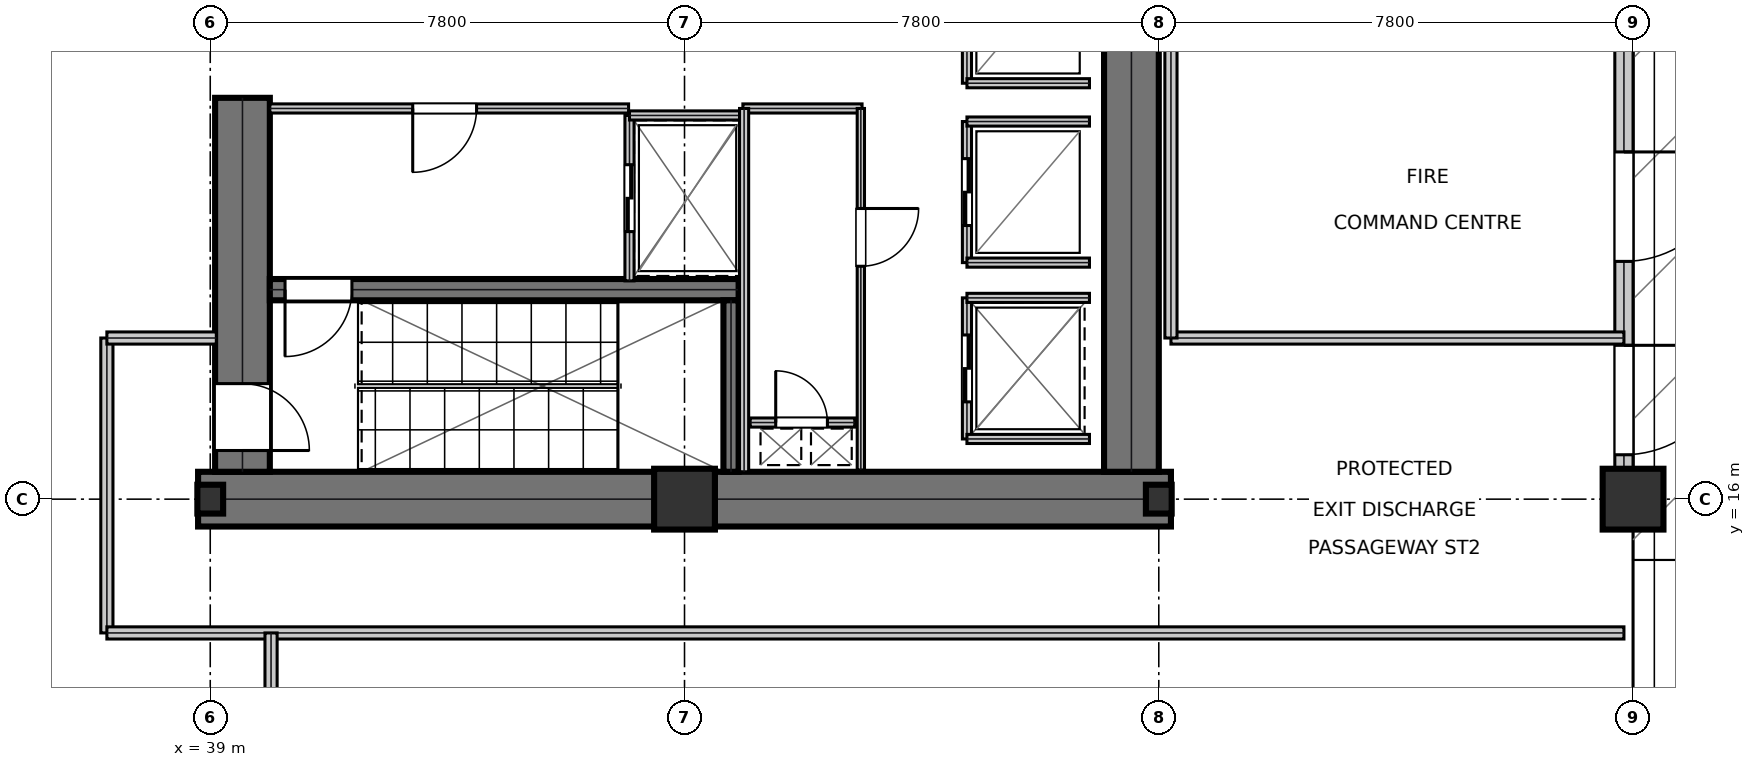
"""IFC4 building model, lengths in metres.
Left out: names, types, materials, properties, quantities, classifications, styles, units other than length and angle.
Written with IfcOpenShell. Run it as: python <this file> out.ifc"""

import sys

from ifc_helpers import new_model, si_unit, direction, frame, frame_2d, origin, origin_2d, place, context, subcontext, project, spatial, rectangle, i_section, extrude, element, fill, save


model = new_model("IFC4")
c1 = context("Model", 3, precision=1e-05, world=origin(), true_north=direction((0.0, 1.0)))
c2 = subcontext(c1, "Body", "Model", "MODEL_VIEW")
j1 = project(units=[si_unit("LENGTHUNIT", "METRE"), si_unit("PLANEANGLEUNIT", "RADIAN")], contexts=[c1])
p1 = place(None, origin())
s1 = spatial("IfcSite", under=j1, at=p1, CompositionType="ELEMENT")
p2 = place(p1, origin())
s2 = spatial("IfcBuilding", under=s1, at=p2, CompositionType="ELEMENT")
p3 = place(p2, origin())
s3 = spatial("IfcBuildingStorey", under=s2, at=p3, CompositionType="ELEMENT", Elevation=0.0)
p4 = place(p3, frame((38.8, 16.0, 0.0), z_axis=(0.0, 0.0, 1.0), x_axis=(1.0, 0.0, 0.0)))
e1 = element("IfcWall", 1, at=p4, inside=s3, PredefinedType="SHEAR", context=c2, shape_type="SweptSolid", body=[
    extrude(rectangle(XDim=16.0, YDim=0.9, at=frame_2d((8.0, 0.0))), origin(), (0.0, 0.0, 1.0), 5.12),
])
p5 = place(p3, frame((39.53, 16.45, 0.0), z_axis=(0.0, 0.0, 1.0), x_axis=(0.0, 1.0, 0.0)))
e2 = element("IfcWall", 2, at=p5, inside=s3, PredefinedType="SHEAR", context=c2, shape_type="SweptSolid", body=[
    extrude(rectangle(XDim=6.15, YDim=0.9, at=frame_2d((3.075, 0.0))), origin(), (0.0, 0.0, 1.0), 5.12),
])
p6 = place(p5, frame((0.35, 0.0, 0.0)))
e3 = element("IfcOpeningElement", 3, at=p6, cuts=e2, PredefinedType="OPENING", context=c2, shape_type="SweptSolid", body=[
    extrude(rectangle(XDim=1.1, YDim=2.15, at=frame_2d((0.55, 1.075))), frame((0.0, 0.46, 0.0), z_axis=(0.0, -1.0, 0.0), x_axis=(1.0, 0.0, 0.0)), (0.0, 0.0, 1.0), 0.92),
])
p7 = place(p3, frame((54.15, 16.45, 0.0), z_axis=(0.0, 0.0, 1.0), x_axis=(0.0, 1.0, 0.0)))
e4 = element("IfcWall", 4, at=p7, inside=s3, PredefinedType="SHEAR", context=c2, shape_type="SweptSolid", body=[
    extrude(rectangle(XDim=15.1, YDim=0.9, at=frame_2d((7.55, 0.0))), origin(), (0.0, 0.0, 1.0), 5.12),
])
p8 = place(p3, frame((39.98, 19.445, 0.0), z_axis=(0.0, 0.0, 1.0), x_axis=(1.0, 0.0, 0.0)))
e5 = element("IfcWall", 5, at=p8, inside=s3, PredefinedType="SHEAR", context=c2, shape_type="SweptSolid", body=[
    extrude(rectangle(XDim=7.71, YDim=0.35, at=frame_2d((3.855, 0.0))), origin(), (0.0, 0.0, 1.0), 5.12),
])
p9 = place(p8, frame((0.25, 0.0, 0.0)))
e6 = element("IfcOpeningElement", 6, at=p9, cuts=e5, PredefinedType="OPENING", context=c2, shape_type="SweptSolid", body=[
    extrude(rectangle(XDim=1.1, YDim=2.15, at=frame_2d((0.55, 1.075))), frame((0.0, 0.185, 0.0), z_axis=(0.0, -1.0, 0.0), x_axis=(1.0, 0.0, 0.0)), (0.0, 0.0, 1.0), 0.37),
])
p10 = place(p3, frame((47.565, 16.45, 0.0), z_axis=(0.0, 0.0, 1.0), x_axis=(0.0, 1.0, 0.0)))
e7 = element("IfcWall", 7, at=p10, inside=s3, PredefinedType="SHEAR", context=c2, shape_type="SweptSolid", body=[
    extrude(rectangle(XDim=2.82, YDim=0.25, at=frame_2d((1.41, 0.0))), origin(), (0.0, 0.0, 1.0), 5.12),
])
p11 = place(p3, frame((39.0, 16.0, 0.0), z_axis=(0.0, 0.0, 1.0), x_axis=(1.0, 0.0, 0.0)))
e8 = element("IfcColumn", 8, at=p11, inside=s3, PredefinedType="COLUMN", context=c2, shape_type="SweptSolid", body=[
    extrude(i_section(OverallWidth=0.424, OverallDepth=0.474, WebThickness=0.048, FlangeThickness=0.077, at=origin_2d()), origin(), (0.0, 0.0, 1.0), 5.395),
])
p12 = place(p3, frame((46.8, 16.0, 0.0), z_axis=(0.0, 0.0, 1.0), x_axis=(1.0, 0.0, 0.0)))
e9 = element("IfcColumn", 9, at=p12, inside=s3, PredefinedType="COLUMN", context=c2, shape_type="SweptSolid", body=[
    extrude(rectangle(XDim=1.0, YDim=1.0, at=origin_2d()), origin(), (0.0, 0.0, 1.0), 5.395),
])
p13 = place(p3, frame((54.6, 16.0, 0.0), z_axis=(0.0, 0.0, 1.0), x_axis=(1.0, 0.0, 0.0)))
e10 = element("IfcColumn", 10, at=p13, inside=s3, PredefinedType="COLUMN", context=c2, shape_type="SweptSolid", body=[
    extrude(i_section(OverallWidth=0.424, OverallDepth=0.474, WebThickness=0.048, FlangeThickness=0.077, at=origin_2d()), origin(), (0.0, 0.0, 1.0), 5.395),
])
p14 = place(p3, frame((62.4, 16.0, 0.0), z_axis=(0.0, 0.0, 1.0), x_axis=(1.0, 0.0, 0.0)))
e11 = element("IfcColumn", 11, at=p14, inside=s3, PredefinedType="COLUMN", context=c2, shape_type="SweptSolid", body=[
    extrude(rectangle(XDim=1.0, YDim=1.0, at=origin_2d()), origin(), (0.0, 0.0, 1.0), 5.395),
])
p15 = place(p3, frame((62.25, 16.51, 0.0), z_axis=(0.0, 0.0, 1.0), x_axis=(0.0, 1.0, 0.0)))
e12 = element("IfcWall", 12, at=p15, inside=s3, PredefinedType="STANDARD", context=c2, shape_type="SweptSolid", body=[
    extrude(rectangle(XDim=6.98, YDim=0.3, at=frame_2d((3.49, 0.0))), origin(), (0.0, 0.0, 1.0), 4.648),
])
p16 = place(p15, frame((0.22, 0.0, 0.0)))
e13 = element("IfcOpeningElement", 13, at=p16, cuts=e12, PredefinedType="OPENING", context=c2, shape_type="SweptSolid", body=[
    extrude(rectangle(XDim=1.8, YDim=2.2, at=frame_2d((0.9, 1.1))), frame((0.0, 0.16, 0.0), z_axis=(0.0, -1.0, 0.0), x_axis=(1.0, 0.0, 0.0)), (0.0, 0.0, 1.0), 0.32),
])
p17 = place(p15, frame((3.4, 0.0, 0.0)))
e14 = element("IfcOpeningElement", 14, at=p17, cuts=e12, PredefinedType="OPENING", context=c2, shape_type="SweptSolid", body=[
    extrude(rectangle(XDim=1.8, YDim=2.2, at=frame_2d((0.9, 1.1))), frame((0.0, 0.16, 0.0), z_axis=(0.0, -1.0, 0.0), x_axis=(1.0, 0.0, 0.0)), (0.0, 0.0, 1.0), 0.32),
])
p18 = place(p3, frame((39.98, 22.425, 0.0), z_axis=(0.0, 0.0, 1.0), x_axis=(1.0, 0.0, 0.0)))
e15 = element("IfcWall", 15, at=p18, inside=s3, PredefinedType="PARTITIONING", context=c2, shape_type="SweptSolid", body=[
    extrude(rectangle(XDim=5.9, YDim=0.15, at=frame_2d((2.95, 0.0))), origin(), (0.0, 0.0, 1.0), 5.12),
])
p19 = place(p18, frame((2.35, 0.0, 0.0)))
e16 = element("IfcOpeningElement", 16, at=p19, cuts=e15, PredefinedType="OPENING", context=c2, shape_type="SweptSolid", body=[
    extrude(rectangle(XDim=1.05, YDim=2.15, at=frame_2d((0.525, 1.075))), frame((0.0, 0.085, 0.0), z_axis=(0.0, -1.0, 0.0), x_axis=(1.0, 0.0, 0.0)), (0.0, 0.0, 1.0), 0.17),
])
p20 = place(p3, frame((45.895, 19.59, 0.0), z_axis=(0.0, 0.0, 1.0), x_axis=(0.0, 1.0, 0.0)))
e17 = element("IfcWall", 17, at=p20, inside=s3, PredefinedType="PARTITIONING", context=c2, shape_type="SweptSolid", body=[
    extrude(rectangle(XDim=2.72, YDim=0.15, at=frame_2d((1.36, 0.0))), origin(), (0.0, 0.0, 1.0), 5.12),
])
p21 = place(p20, frame((0.81, 0.0, 0.0)))
e18 = element("IfcOpeningElement", 18, at=p21, cuts=e17, PredefinedType="OPENING", context=c2, shape_type="SweptSolid", body=[
    extrude(rectangle(XDim=1.1, YDim=2.15, at=frame_2d((0.55, 1.075))), frame((0.0, 0.085, 0.0), z_axis=(0.0, -1.0, 0.0), x_axis=(1.0, 0.0, 0.0)), (0.0, 0.0, 1.0), 0.17),
])
p22 = place(p3, frame((45.895, 22.31, 0.0), z_axis=(0.0, 0.0, 1.0), x_axis=(1.0, 0.0, 0.0)))
e19 = element("IfcWall", 19, at=p22, inside=s3, PredefinedType="PARTITIONING", context=c2, shape_type="SweptSolid", body=[
    extrude(rectangle(XDim=1.915, YDim=0.15, at=frame_2d((0.958, 0.0))), origin(), (0.0, 0.0, 1.0), 5.12),
])
p23 = place(p3, frame((51.445, 19.89, 0.0), z_axis=(0.0, 0.0, 1.0), x_axis=(0.0, 1.0, 0.0)))
e20 = element("IfcWall", 20, at=p23, inside=s3, PredefinedType="PARTITIONING", context=c2, shape_type="SweptSolid", body=[
    extrude(rectangle(XDim=2.32, YDim=0.15, at=frame_2d((1.16, 0.0))), origin(), (0.0, 0.0, 1.0), 5.12),
])
p24 = place(p23, frame((0.61, 0.0, 0.0)))
e21 = element("IfcOpeningElement", 21, at=p24, cuts=e20, PredefinedType="OPENING", context=c2, shape_type="SweptSolid", body=[
    extrude(rectangle(XDim=1.1, YDim=2.15, at=frame_2d((0.55, 1.075))), frame((0.0, 0.085, 0.0), z_axis=(0.0, -1.0, 0.0), x_axis=(1.0, 0.0, 0.0)), (0.0, 0.0, 1.0), 0.17),
])
for number, where, z_axis, x_axis in (
    (22, (51.445, 19.89, 0.0), (0.0, 0.0, 1.0), (1.0, 0.0, 0.0)),
    (23, (51.445, 22.21, 0.0), (0.0, 0.0, 1.0), (1.0, 0.0, 0.0)),
):
    element("IfcWall", number, at=place(p3, frame(where, z_axis=z_axis, x_axis=x_axis)), inside=s3, PredefinedType="PARTITIONING", context=c2, shape_type="SweptSolid", body=[
        extrude(rectangle(XDim=2.015, YDim=0.15, at=frame_2d((1.007, 0.0))), origin(), (0.0, 0.0, 1.0), 5.12),
    ])
p25 = place(p3, frame((51.445, 22.84, 0.0), z_axis=(0.0, 0.0, 1.0), x_axis=(0.0, 1.0, 0.0)))
e24 = element("IfcWall", 24, at=p25, inside=s3, PredefinedType="PARTITIONING", context=c2, shape_type="SweptSolid", body=[
    extrude(rectangle(XDim=2.32, YDim=0.15, at=frame_2d((1.16, 0.0))), origin(), (0.0, 0.0, 1.0), 5.12),
])
p26 = place(p25, frame((0.61, 0.0, 0.0)))
e25 = element("IfcOpeningElement", 25, at=p26, cuts=e24, PredefinedType="OPENING", context=c2, shape_type="SweptSolid", body=[
    extrude(rectangle(XDim=1.1, YDim=2.15, at=frame_2d((0.55, 1.075))), frame((0.0, 0.085, 0.0), z_axis=(0.0, -1.0, 0.0), x_axis=(1.0, 0.0, 0.0)), (0.0, 0.0, 1.0), 0.17),
])
p27 = place(p3, frame((51.445, 22.84, 0.0), z_axis=(0.0, 0.0, 1.0), x_axis=(1.0, 0.0, 0.0)))
e26 = element("IfcWall", 26, at=p27, inside=s3, PredefinedType="PARTITIONING", context=c2, shape_type="SweptSolid", body=[
    extrude(rectangle(XDim=2.015, YDim=0.15, at=frame_2d((1.007, 0.0))), origin(), (0.0, 0.0, 1.0), 5.12),
])
p28 = place(p3, frame((51.445, 16.99, 0.0), z_axis=(0.0, 0.0, 1.0), x_axis=(0.0, 1.0, 0.0)))
e27 = element("IfcWall", 27, at=p28, inside=s3, PredefinedType="PARTITIONING", context=c2, shape_type="SweptSolid", body=[
    extrude(rectangle(XDim=2.32, YDim=0.15, at=frame_2d((1.16, 0.0))), origin(), (0.0, 0.0, 1.0), 5.12),
])
p29 = place(p28, frame((0.61, 0.0, 0.0)))
e28 = element("IfcOpeningElement", 28, at=p29, cuts=e27, PredefinedType="OPENING", context=c2, shape_type="SweptSolid", body=[
    extrude(rectangle(XDim=1.1, YDim=2.15, at=frame_2d((0.55, 1.075))), frame((0.0, 0.085, 0.0), z_axis=(0.0, -1.0, 0.0), x_axis=(1.0, 0.0, 0.0)), (0.0, 0.0, 1.0), 0.17),
])
for number, where, z_axis, x_axis in (
    (29, (51.445, 16.99, 0.0), (0.0, 0.0, 1.0), (1.0, 0.0, 0.0)),
    (30, (51.445, 19.31, 0.0), (0.0, 0.0, 1.0), (1.0, 0.0, 0.0)),
):
    element("IfcWall", number, at=place(p3, frame(where, z_axis=z_axis, x_axis=x_axis)), inside=s3, PredefinedType="PARTITIONING", context=c2, shape_type="SweptSolid", body=[
        extrude(rectangle(XDim=2.015, YDim=0.15, at=frame_2d((1.007, 0.0))), origin(), (0.0, 0.0, 1.0), 5.12),
    ])
p30 = place(p3, frame((47.88, 17.26, 0.0), z_axis=(0.0, 0.0, 1.0), x_axis=(1.0, 0.0, 0.0)))
e31 = element("IfcWall", 31, at=p30, inside=s3, PredefinedType="PARTITIONING", context=c2, shape_type="SweptSolid", body=[
    extrude(rectangle(XDim=1.72, YDim=0.15, at=frame_2d((0.86, 0.0))), origin(), (0.0, 0.0, 1.0), 5.12),
])
p31 = place(p30, frame((0.42, 0.0, 0.0)))
e32 = element("IfcOpeningElement", 32, at=p31, cuts=e31, PredefinedType="OPENING", context=c2, shape_type="SweptSolid", body=[
    extrude(rectangle(XDim=0.85, YDim=2.15, at=frame_2d((0.425, 1.075))), frame((0.0, 0.085, 0.0), z_axis=(0.0, -1.0, 0.0), x_axis=(1.0, 0.0, 0.0)), (0.0, 0.0, 1.0), 0.17),
])
p32 = place(p3, frame((47.76, 22.425, 0.0), z_axis=(0.0, 0.0, 1.0), x_axis=(1.0, 0.0, 0.0)))
e33 = element("IfcWall", 33, at=p32, inside=s3, PredefinedType="PARTITIONING", context=c2, shape_type="SweptSolid", body=[
    extrude(rectangle(XDim=1.96, YDim=0.15, at=frame_2d((0.98, 0.0))), origin(), (0.0, 0.0, 1.0), 5.12),
])
p33 = place(p3, frame((47.78, 16.45, 0.0), z_axis=(0.0, 0.0, 1.0), x_axis=(0.0, 1.0, 0.0)))
e34 = element("IfcWall", 34, at=p33, inside=s3, PredefinedType="PARTITIONING", context=c2, shape_type="SweptSolid", body=[
    extrude(rectangle(XDim=5.975, YDim=0.15, at=frame_2d((2.988, 0.0))), origin(), (0.0, 0.0, 1.0), 5.12),
])
p34 = place(p3, frame((49.7, 16.48, 0.0), z_axis=(0.0, 0.0, 1.0), x_axis=(0.0, 1.0, 0.0)))
e35 = element("IfcWall", 35, at=p34, inside=s3, PredefinedType="PARTITIONING", context=c2, shape_type="SweptSolid", body=[
    extrude(rectangle(XDim=5.945, YDim=0.12, at=frame_2d((2.973, 0.0))), origin(), (0.0, 0.0, 1.0), 5.12),
])
p35 = place(p34, frame((3.35, 0.0, 0.0)))
e36 = element("IfcOpeningElement", 36, at=p35, cuts=e35, PredefinedType="OPENING", context=c2, shape_type="SweptSolid", body=[
    extrude(rectangle(XDim=0.95, YDim=2.15, at=frame_2d((0.475, 1.075))), frame((0.0, 0.07, 0.0), z_axis=(0.0, -1.0, 0.0), x_axis=(1.0, 0.0, 0.0)), (0.0, 0.0, 1.0), 0.14),
])
p36 = place(p3, frame((37.3, 13.8, 0.0), z_axis=(0.0, 0.0, 1.0), x_axis=(0.0, 1.0, 0.0)))
e37 = element("IfcWall", 37, at=p36, inside=s3, PredefinedType="SOLIDWALL", context=c2, shape_type="SweptSolid", body=[
    extrude(rectangle(XDim=4.85, YDim=0.2, at=frame_2d((2.425, 0.0))), origin(), (0.0, 0.0, 1.0), 3.688),
])
p37 = place(p3, frame((37.3, 18.65, 0.0), z_axis=(0.0, 0.0, 1.0), x_axis=(1.0, 0.0, 0.0)))
e38 = element("IfcWall", 38, at=p37, inside=s3, PredefinedType="SOLIDWALL", context=c2, shape_type="SweptSolid", body=[
    extrude(rectangle(XDim=1.8, YDim=0.2, at=frame_2d((0.9, 0.0))), origin(), (0.0, 0.0, 1.0), 4.415),
])
p38 = place(p3, frame((37.3, 13.8, 0.0), z_axis=(0.0, 0.0, 1.0), x_axis=(1.0, 0.0, 0.0)))
e39 = element("IfcWall", 39, at=p38, inside=s3, PredefinedType="SOLIDWALL", context=c2, shape_type="SweptSolid", body=[
    extrude(rectangle(XDim=24.95, YDim=0.2, at=frame_2d((12.475, 0.0))), origin(), (0.0, 0.0, 1.0), 4.415),
])
p39 = place(p3, frame((54.8, 18.65, 0.0), z_axis=(0.0, 0.0, 1.0), x_axis=(1.0, 0.0, 0.0)))
e40 = element("IfcWall", 40, at=p39, inside=s3, PredefinedType="SOLIDWALL", context=c2, shape_type="SweptSolid", body=[
    extrude(rectangle(XDim=7.45, YDim=0.2, at=frame_2d((3.725, 0.0))), origin(), (0.0, 0.0, 1.0), 5.12),
])
p40 = place(p3, frame((54.8, 18.65, 0.0), z_axis=(0.0, 0.0, 1.0), x_axis=(0.0, 1.0, 0.0)))
e41 = element("IfcWall", 41, at=p40, inside=s3, PredefinedType="SOLIDWALL", context=c2, shape_type="SweptSolid", body=[
    extrude(rectangle(XDim=9.95, YDim=0.2, at=frame_2d((4.975, 0.0))), origin(), (0.0, 0.0, 1.0), 4.338),
])
p41 = place(p3, frame((40.0, -4.85, 0.0), z_axis=(0.0, 0.0, 1.0), x_axis=(0.0, 1.0, 0.0)))
e42 = element("IfcWall", 42, at=p41, inside=s3, PredefinedType="SOLIDWALL", context=c2, shape_type="SweptSolid", body=[
    extrude(rectangle(XDim=18.65, YDim=0.2, at=frame_2d((9.325, 0.0))), origin(), (0.0, 0.0, 1.0), 4.338),
])
p42 = place(p41, frame((8.6, 0.0, 0.0)))
e43 = element("IfcOpeningElement", 43, at=p42, cuts=e42, PredefinedType="OPENING", context=c2, shape_type="SweptSolid", body=[
    extrude(rectangle(XDim=1.5, YDim=2.25, at=frame_2d((0.75, 1.125))), frame((0.0, 0.11, 0.0), z_axis=(0.0, -1.0, 0.0), x_axis=(1.0, 0.0, 0.0)), (0.0, 0.0, 1.0), 0.22),
])
p43 = place(p16, frame((1.8, 0.0, 0.0), z_axis=(0.0, 0.0, 1.0), x_axis=(-1.0, 0.0, 0.0)))
e44 = element("IfcDoor", 44, at=p43, inside=s3, OperationType="SINGLE_SWING_LEFT", PredefinedType="DOOR", context=c2, shape_type="SweptSolid", body=[
    extrude(rectangle(XDim=1.8, YDim=2.2, at=frame_2d((0.9, 1.1))), frame((0.0, 0.025, 0.0), z_axis=(0.0, -1.0, 0.0), x_axis=(1.0, 0.0, 0.0)), (0.0, 0.0, 1.0), 0.05),
])
fill(e13, e44)
p44 = place(p17, frame((1.8, 0.0, 0.0), z_axis=(0.0, 0.0, 1.0), x_axis=(-1.0, 0.0, 0.0)))
e45 = element("IfcDoor", 45, at=p44, inside=s3, OperationType="SINGLE_SWING_LEFT", PredefinedType="DOOR", context=c2, shape_type="SweptSolid", body=[
    extrude(rectangle(XDim=1.8, YDim=2.2, at=frame_2d((0.9, 1.1))), frame((0.0, 0.025, 0.0), z_axis=(0.0, -1.0, 0.0), x_axis=(1.0, 0.0, 0.0)), (0.0, 0.0, 1.0), 0.05),
])
fill(e14, e45)
p45 = place(p19, frame((1.05, 0.0, 0.0), z_axis=(0.0, 0.0, 1.0), x_axis=(-1.0, 0.0, 0.0)))
e46 = element("IfcDoor", 46, at=p45, inside=s3, OperationType="SINGLE_SWING_RIGHT", PredefinedType="DOOR", context=c2, shape_type="SweptSolid", body=[
    extrude(rectangle(XDim=1.05, YDim=2.15, at=frame_2d((0.525, 1.075))), frame((0.0, 0.025, 0.0), z_axis=(0.0, -1.0, 0.0), x_axis=(1.0, 0.0, 0.0)), (0.0, 0.0, 1.0), 0.05),
])
fill(e16, e46)
p46 = place(p21, frame((1.1, 0.0, 0.0), z_axis=(0.0, 0.0, 1.0), x_axis=(-1.0, 0.0, 0.0)))
e47 = element("IfcDoor", 47, at=p46, inside=s3, OperationType="DOUBLE_DOOR_SLIDING", PredefinedType="DOOR", context=c2, shape_type="SweptSolid", body=[
    extrude(rectangle(XDim=1.1, YDim=2.15, at=frame_2d((0.55, 1.075))), frame((0.0, 0.025, 0.0), z_axis=(0.0, -1.0, 0.0), x_axis=(1.0, 0.0, 0.0)), (0.0, 0.0, 1.0), 0.05),
])
fill(e18, e47)
p47 = place(p24, frame((1.1, 0.0, 0.0), z_axis=(0.0, 0.0, 1.0), x_axis=(-1.0, 0.0, 0.0)))
e48 = element("IfcDoor", 48, at=p47, inside=s3, OperationType="DOUBLE_DOOR_SLIDING", PredefinedType="DOOR", context=c2, shape_type="SweptSolid", body=[
    extrude(rectangle(XDim=1.1, YDim=2.15, at=frame_2d((0.55, 1.075))), frame((0.0, 0.025, 0.0), z_axis=(0.0, -1.0, 0.0), x_axis=(1.0, 0.0, 0.0)), (0.0, 0.0, 1.0), 0.05),
])
fill(e21, e48)
p48 = place(p29, frame((1.1, 0.0, 0.0), z_axis=(0.0, 0.0, 1.0), x_axis=(-1.0, 0.0, 0.0)))
e49 = element("IfcDoor", 49, at=p48, inside=s3, OperationType="DOUBLE_DOOR_SLIDING", PredefinedType="DOOR", context=c2, shape_type="SweptSolid", body=[
    extrude(rectangle(XDim=1.1, YDim=2.15, at=frame_2d((0.55, 1.075))), frame((0.0, 0.025, 0.0), z_axis=(0.0, -1.0, 0.0), x_axis=(1.0, 0.0, 0.0)), (0.0, 0.0, 1.0), 0.05),
])
fill(e28, e49)
p49 = place(p31, origin())
e50 = element("IfcDoor", 50, at=p49, inside=s3, OperationType="SINGLE_SWING_LEFT", PredefinedType="TRAPDOOR", context=c2, shape_type="SweptSolid", body=[
    extrude(rectangle(XDim=0.85, YDim=2.15, at=frame_2d((0.425, 1.075))), frame((0.0, 0.025, 0.0), z_axis=(0.0, -1.0, 0.0), x_axis=(1.0, 0.0, 0.0)), (0.0, 0.0, 1.0), 0.05),
])
fill(e32, e50)
p50 = place(p35, frame((0.95, 0.0, 0.0), z_axis=(0.0, 0.0, 1.0), x_axis=(-1.0, 0.0, 0.0)))
e51 = element("IfcDoor", 51, at=p50, inside=s3, OperationType="SINGLE_SWING_LEFT", PredefinedType="DOOR", context=c2, shape_type="SweptSolid", body=[
    extrude(rectangle(XDim=0.95, YDim=2.15, at=frame_2d((0.475, 1.075))), frame((0.0, 0.025, 0.0), z_axis=(0.0, -1.0, 0.0), x_axis=(1.0, 0.0, 0.0)), (0.0, 0.0, 1.0), 0.05),
])
fill(e36, e51)
p51 = place(p9, frame((1.1, 0.0, 0.0), z_axis=(0.0, 0.0, 1.0), x_axis=(-1.0, 0.0, 0.0)))
e52 = element("IfcDoor", 52, at=p51, inside=s3, OperationType="SINGLE_SWING_RIGHT", PredefinedType="DOOR", context=c2, shape_type="SweptSolid", body=[
    extrude(rectangle(XDim=1.1, YDim=2.15, at=frame_2d((0.55, 1.075))), frame((0.0, 0.025, 0.0), z_axis=(0.0, -1.0, 0.0), x_axis=(1.0, 0.0, 0.0)), (0.0, 0.0, 1.0), 0.05),
])
fill(e6, e52)
p52 = place(p6, frame((1.1, 0.0, 0.0), z_axis=(0.0, 0.0, 1.0), x_axis=(-1.0, 0.0, 0.0)))
e53 = element("IfcDoor", 53, at=p52, inside=s3, OperationType="SINGLE_SWING_RIGHT", PredefinedType="DOOR", context=c2, shape_type="SweptSolid", body=[
    extrude(rectangle(XDim=1.1, YDim=2.15, at=frame_2d((0.55, 1.075))), frame((0.0, 0.025, 0.0), z_axis=(0.0, -1.0, 0.0), x_axis=(1.0, 0.0, 0.0)), (0.0, 0.0, 1.0), 0.05),
])
fill(e3, e53)
save(model, sys.argv[1])
